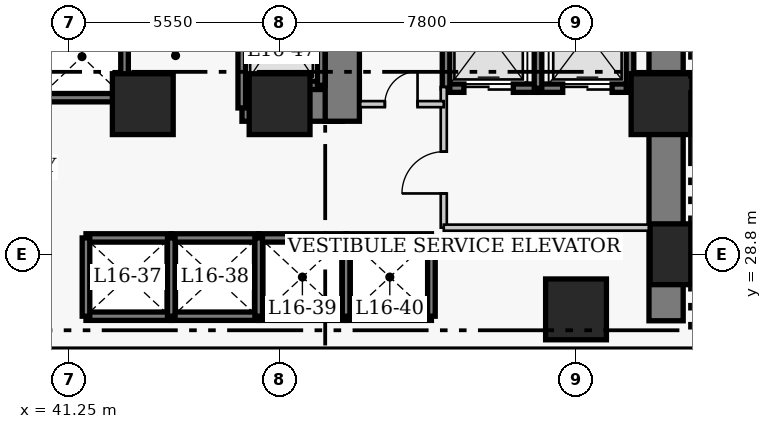
"""IFC4 building model, lengths in metres.
Left out: names, types, materials, properties, quantities, classifications, styles, units other than length and angle.
Written with IfcOpenShell. Run it as: python <this file> out.ifc"""

import sys

from ifc_helpers import new_model, si_unit, direction, frame, frame_2d, origin, origin_2d, place, context, subcontext, project, spatial, rectangle, extrude, element, fill, save


model = new_model("IFC4")
c1 = context("Model", 3, precision=1e-05, world=origin(), true_north=direction((0.0, 1.0)))
c2 = subcontext(c1, "Body", "Model", "MODEL_VIEW")
j1 = project(units=[si_unit("LENGTHUNIT", "METRE"), si_unit("PLANEANGLEUNIT", "RADIAN")], contexts=[c1])
p1 = place(None, origin())
s1 = spatial("IfcSite", under=j1, at=p1, CompositionType="ELEMENT")
p2 = place(p1, origin())
s2 = spatial("IfcBuilding", under=s1, at=p2, CompositionType="ELEMENT")
p3 = place(p2, frame((0.0, 0.0, 67.8)))
s3 = spatial("IfcBuildingStorey", under=s2, at=p3, CompositionType="ELEMENT", Elevation=67.8)
p4 = place(p3, frame((56.97, 27.05, 0.0), z_axis=(0.0, 0.0, 1.0), x_axis=(0.0, 1.0, 0.0)))
e1 = element("IfcWall", 1, at=p4, inside=s3, PredefinedType="SHEAR", context=c2, shape_type="SweptSolid", body=[
    extrude(rectangle(XDim=13.72, YDim=0.9, at=frame_2d((6.86, 0.0))), origin(), (0.0, 0.0, 1.0), 3.8),
])
p5 = place(p3, frame((45.81, 32.75, 0.0), z_axis=(0.0, 0.0, 1.0), x_axis=(1.0, 0.0, 0.0)))
e2 = element("IfcWall", 2, at=p5, inside=s3, PredefinedType="SHEAR", context=c2, shape_type="SweptSolid", body=[
    extrude(rectangle(XDim=2.64, YDim=0.9, at=frame_2d((1.32, 0.0))), origin(), (0.0, 0.0, 1.0), 3.8),
])
p6 = place(p3, frame((48.45, 32.3, 0.0), z_axis=(0.0, 0.0, 1.0), x_axis=(0.0, 1.0, 0.0)))
e3 = element("IfcWall", 3, at=p6, inside=s3, PredefinedType="SHEAR", context=c2, shape_type="SweptSolid", body=[
    extrude(rectangle(XDim=8.02, YDim=0.9, at=frame_2d((4.01, 0.0))), origin(), (0.0, 0.0, 1.0), 3.8),
])
p7 = place(p6, frame((5.9, 0.0, 0.0)))
e4 = element("IfcOpeningElement", 4, at=p7, cuts=e3, PredefinedType="OPENING", context=c2, shape_type="SweptSolid", body=[
    extrude(rectangle(XDim=1.1, YDim=2.15, at=frame_2d((0.55, 1.075))), frame((0.0, 0.46, 0.0), z_axis=(0.0, -1.0, 0.0), x_axis=(1.0, 0.0, 0.0)), (0.0, 0.0, 1.0), 0.92),
])
for number, where, z_axis, x_axis in (
    (5, (57.35, 28.8, 0.0), (0.0, 0.0, 1.0), (1.0, 0.0, 0.0)),
    (6, (43.2, 32.75, 0.0), (0.0, 0.0, 1.0), (1.0, 0.0, 0.0)),
    (7, (46.8, 32.75, 0.0), (0.0, 0.0, 1.0), (1.0, 0.0, 0.0)),
    (8, (54.6, 27.35, 0.0), (0.0, 0.0, 1.0), (1.0, 0.0, 0.0)),
    (9, (56.85, 32.75, 0.0), (0.0, 0.0, 1.0), (1.0, 0.0, 0.0)),
):
    element("IfcColumn", number, at=place(p3, frame(where, z_axis=z_axis, x_axis=x_axis)), inside=s3, PredefinedType="COLUMN", context=c2, shape_type="SweptSolid", body=[
        extrude(rectangle(XDim=1.6, YDim=1.6, at=origin_2d()), origin(), (0.0, 0.0, 1.0), 3.8),
    ])
for number, where, z_axis, x_axis in (
    (10, (41.705, 29.23, 0.0), (0.0, 0.0, 1.0), (1.0, 0.0, 0.0)),
    (11, (41.705, 27.17, 0.0), (0.0, 0.0, 1.0), (1.0, 0.0, 0.0)),
):
    element("IfcWall", number, at=place(p3, frame(where, z_axis=z_axis, x_axis=x_axis)), inside=s3, PredefinedType="SHEAR", context=c2, shape_type="SweptSolid", body=[
        extrude(rectangle(XDim=2.245, YDim=0.22, at=frame_2d((1.123, 0.0))), origin(), (0.0, 0.0, 1.0), 3.8),
    ])
p8 = place(p3, frame((41.705, 27.17, 0.0), z_axis=(0.0, 0.0, 1.0), x_axis=(0.0, 1.0, 0.0)))
e12 = element("IfcWall", 12, at=p8, inside=s3, PredefinedType="SHEAR", context=c2, shape_type="SweptSolid", body=[
    extrude(rectangle(XDim=2.06, YDim=0.2, at=frame_2d((1.03, 0.0))), origin(), (0.0, 0.0, 1.0), 3.8),
])
for number, where, z_axis, x_axis in (
    (13, (43.95, 29.23, 0.0), (0.0, 0.0, 1.0), (1.0, 0.0, 0.0)),
    (14, (43.95, 27.17, 0.0), (0.0, 0.0, 1.0), (1.0, 0.0, 0.0)),
):
    element("IfcWall", number, at=place(p3, frame(where, z_axis=z_axis, x_axis=x_axis)), inside=s3, PredefinedType="SHEAR", context=c2, shape_type="SweptSolid", body=[
        extrude(rectangle(XDim=2.3, YDim=0.22, at=frame_2d((1.15, 0.0))), origin(), (0.0, 0.0, 1.0), 3.8),
    ])
p9 = place(p3, frame((43.95, 27.17, 0.0), z_axis=(0.0, 0.0, 1.0), x_axis=(0.0, 1.0, 0.0)))
e15 = element("IfcWall", 15, at=p9, inside=s3, PredefinedType="SHEAR", context=c2, shape_type="SweptSolid", body=[
    extrude(rectangle(XDim=2.06, YDim=0.2, at=frame_2d((1.03, 0.0))), origin(), (0.0, 0.0, 1.0), 3.8),
])
for number, where, z_axis, x_axis in (
    (16, (46.25, 29.23, 0.0), (0.0, 0.0, 1.0), (1.0, 0.0, 0.0)),
    (17, (46.25, 27.17, 0.0), (0.0, 0.0, 1.0), (1.0, 0.0, 0.0)),
):
    element("IfcWall", number, at=place(p3, frame(where, z_axis=z_axis, x_axis=x_axis)), inside=s3, PredefinedType="SHEAR", context=c2, shape_type="SweptSolid", body=[
        extrude(rectangle(XDim=2.3, YDim=0.22, at=frame_2d((1.15, 0.0))), origin(), (0.0, 0.0, 1.0), 3.8),
    ])
p10 = place(p3, frame((46.25, 27.17, 0.0), z_axis=(0.0, 0.0, 1.0), x_axis=(0.0, 1.0, 0.0)))
e18 = element("IfcWall", 18, at=p10, inside=s3, PredefinedType="SHEAR", context=c2, shape_type="SweptSolid", body=[
    extrude(rectangle(XDim=2.06, YDim=0.2, at=frame_2d((1.03, 0.0))), origin(), (0.0, 0.0, 1.0), 3.8),
])
for number, where, z_axis, x_axis in (
    (19, (48.55, 29.23, 0.0), (0.0, 0.0, 1.0), (1.0, 0.0, 0.0)),
    (20, (48.55, 27.17, 0.0), (0.0, 0.0, 1.0), (1.0, 0.0, 0.0)),
):
    element("IfcWall", number, at=place(p3, frame(where, z_axis=z_axis, x_axis=x_axis)), inside=s3, PredefinedType="SHEAR", context=c2, shape_type="SweptSolid", body=[
        extrude(rectangle(XDim=2.245, YDim=0.22, at=frame_2d((1.123, 0.0))), origin(), (0.0, 0.0, 1.0), 3.8),
    ])
for number, where, z_axis, x_axis in (
    (21, (48.55, 27.17, 0.0), (0.0, 0.0, 1.0), (0.0, 1.0, 0.0)),
    (22, (50.795, 27.17, 0.0), (0.0, 0.0, 1.0), (0.0, 1.0, 0.0)),
):
    element("IfcWall", number, at=place(p3, frame(where, z_axis=z_axis, x_axis=x_axis)), inside=s3, PredefinedType="SHEAR", context=c2, shape_type="SweptSolid", body=[
        extrude(rectangle(XDim=2.06, YDim=0.2, at=frame_2d((1.03, 0.0))), origin(), (0.0, 0.0, 1.0), 3.8),
    ])
p11 = place(p3, frame((40.4, 32.92, 0.0), z_axis=(0.0, 0.0, 1.0), x_axis=(1.0, 0.0, 0.0)))
e23 = element("IfcWall", 23, at=p11, inside=s3, PredefinedType="SHEAR", context=c2, shape_type="SweptSolid", body=[
    extrude(rectangle(XDim=2.32, YDim=0.22, at=frame_2d((1.16, 0.0))), origin(), (0.0, 0.0, 1.0), 3.8),
])
p12 = place(p3, frame((42.72, 32.92, 0.0), z_axis=(0.0, 0.0, 1.0), x_axis=(0.0, 1.0, 0.0)))
e24 = element("IfcWall", 24, at=p12, inside=s3, PredefinedType="SHEAR", context=c2, shape_type="SweptSolid", body=[
    extrude(rectangle(XDim=2.16, YDim=0.2, at=frame_2d((1.08, 0.0))), origin(), (0.0, 0.0, 1.0), 3.8),
])
p13 = place(p3, frame((51.18, 33.17, 0.0), z_axis=(0.0, 0.0, 1.0), x_axis=(1.0, 0.0, 0.0)))
e25 = element("IfcWall", 25, at=p13, inside=s3, PredefinedType="SHEAR", context=c2, shape_type="SweptSolid", body=[
    extrude(rectangle(XDim=2.42, YDim=0.22, at=frame_2d((1.21, 0.0))), origin(), (0.0, 0.0, 1.0), 3.8),
])
p14 = place(p13, frame((0.47, 0.0, 0.0)))
e26 = element("IfcOpeningElement", 26, at=p14, cuts=e25, PredefinedType="OPENING", context=c2, shape_type="SweptSolid", body=[
    extrude(rectangle(XDim=1.3, YDim=2.15, at=frame_2d((0.65, 1.075))), frame((0.0, 0.12, 0.0), z_axis=(0.0, -1.0, 0.0), x_axis=(1.0, 0.0, 0.0)), (0.0, 0.0, 1.0), 0.24),
])
p15 = place(p3, frame((51.18, 33.17, 0.0), z_axis=(0.0, 0.0, 1.0), x_axis=(0.0, 1.0, 0.0)))
e27 = element("IfcWall", 27, at=p15, inside=s3, PredefinedType="SHEAR", context=c2, shape_type="SweptSolid", body=[
    extrude(rectangle(XDim=2.86, YDim=0.2, at=frame_2d((1.43, 0.0))), origin(), (0.0, 0.0, 1.0), 3.8),
])
p16 = place(p3, frame((53.6, 33.17, 0.0), z_axis=(0.0, 0.0, 1.0), x_axis=(1.0, 0.0, 0.0)))
e28 = element("IfcWall", 28, at=p16, inside=s3, PredefinedType="SHEAR", context=c2, shape_type="SweptSolid", body=[
    extrude(rectangle(XDim=2.42, YDim=0.22, at=frame_2d((1.21, 0.0))), origin(), (0.0, 0.0, 1.0), 3.8),
])
p17 = place(p16, frame((0.65, 0.0, 0.0)))
e29 = element("IfcOpeningElement", 29, at=p17, cuts=e28, PredefinedType="OPENING", context=c2, shape_type="SweptSolid", body=[
    extrude(rectangle(XDim=1.3, YDim=2.15, at=frame_2d((0.65, 1.075))), frame((0.0, 0.12, 0.0), z_axis=(0.0, -1.0, 0.0), x_axis=(1.0, 0.0, 0.0)), (0.0, 0.0, 1.0), 0.24),
])
for number, where, z_axis, x_axis in (
    (30, (53.6, 33.17, 0.0), (0.0, 0.0, 1.0), (0.0, 1.0, 0.0)),
    (31, (56.02, 33.17, 0.0), (0.0, 0.0, 1.0), (0.0, 1.0, 0.0)),
):
    element("IfcWall", number, at=place(p3, frame(where, z_axis=z_axis, x_axis=x_axis)), inside=s3, PredefinedType="SHEAR", context=c2, shape_type="SweptSolid", body=[
        extrude(rectangle(XDim=2.86, YDim=0.2, at=frame_2d((1.43, 0.0))), origin(), (0.0, 0.0, 1.0), 3.8),
    ])
p18 = place(p3, frame((45.805, 33.245, 0.0), z_axis=(0.0, 0.0, 1.0), x_axis=(1.0, 0.0, 0.0)))
e32 = element("IfcWall", 32, at=p18, inside=s3, PredefinedType="SHEAR", context=c2, shape_type="SweptSolid", body=[
    extrude(rectangle(XDim=2.09, YDim=0.22, at=frame_2d((1.045, 0.0))), origin(), (0.0, 0.0, 1.0), 3.8),
])
p19 = place(p3, frame((45.805, 32.65, 0.0), z_axis=(0.0, 0.0, 1.0), x_axis=(0.0, 1.0, 0.0)))
e33 = element("IfcWall", 33, at=p19, inside=s3, PredefinedType="SHEAR", context=c2, shape_type="SweptSolid", body=[
    extrude(rectangle(XDim=3.505, YDim=0.2, at=frame_2d((1.752, 0.0))), origin(), (0.0, 0.0, 1.0), 3.8),
])
p20 = place(p3, frame((47.895, 33.245, 0.0), z_axis=(0.0, 0.0, 1.0), x_axis=(0.0, 1.0, 0.0)))
e34 = element("IfcWall", 34, at=p20, inside=s3, PredefinedType="SHEAR", context=c2, shape_type="SweptSolid", body=[
    extrude(rectangle(XDim=2.91, YDim=0.2, at=frame_2d((1.455, 0.0))), origin(), (0.0, 0.0, 1.0), 3.8),
])
p21 = place(p3, frame((51.12, 29.5, 0.0), z_axis=(0.0, 0.0, 1.0), x_axis=(0.0, 1.0, 0.0)))
e35 = element("IfcWall", 35, at=p21, inside=s3, PredefinedType="PARTITIONING", context=c2, shape_type="SweptSolid", body=[
    extrude(rectangle(XDim=3.7, YDim=0.16, at=frame_2d((1.85, 0.0))), origin(), (0.0, 0.0, 1.0), 3.54),
])
p22 = place(p21, frame((0.9, 0.0, 0.0)))
e36 = element("IfcOpeningElement", 36, at=p22, cuts=e35, PredefinedType="OPENING", context=c2, shape_type="SweptSolid", body=[
    extrude(rectangle(XDim=1.1, YDim=2.15, at=frame_2d((0.55, 1.075))), frame((0.0, 0.09, 0.0), z_axis=(0.0, -1.0, 0.0), x_axis=(1.0, 0.0, 0.0)), (0.0, 0.0, 1.0), 0.18),
])
p23 = place(p3, frame((51.12, 29.5, 0.0), z_axis=(0.0, 0.0, 1.0), x_axis=(1.0, 0.0, 0.0)))
e37 = element("IfcWall", 37, at=p23, inside=s3, PredefinedType="PARTITIONING", context=c2, shape_type="SweptSolid", body=[
    extrude(rectangle(XDim=5.63, YDim=0.16, at=frame_2d((2.815, 0.0))), origin(), (0.0, 0.0, 1.0), 3.54),
])
p24 = place(p3, frame((48.92, 32.75, 0.0), z_axis=(0.0, 0.0, 1.0), x_axis=(1.0, 0.0, 0.0)))
e38 = element("IfcWall", 38, at=p24, inside=s3, PredefinedType="PARTITIONING", context=c2, shape_type="SweptSolid", body=[
    extrude(rectangle(XDim=2.2, YDim=0.16, at=frame_2d((1.1, 0.0))), origin(), (0.0, 0.0, 1.0), 3.54),
])
p25 = place(p24, frame((0.65, 0.0, 0.0)))
e39 = element("IfcOpeningElement", 39, at=p25, cuts=e38, PredefinedType="OPENING", context=c2, shape_type="SweptSolid", body=[
    extrude(rectangle(XDim=0.86, YDim=2.05, at=frame_2d((0.43, 1.025))), frame((0.0, 0.09, 0.0), z_axis=(0.0, -1.0, 0.0), x_axis=(1.0, 0.0, 0.0)), (0.0, 0.0, 1.0), 0.18),
])
p26 = place(p3, frame((35.85, 26.26, 0.0), z_axis=(0.0, 0.0, 1.0), x_axis=(1.0, 0.0, 0.0)))
e40 = element("IfcWall", 40, at=p26, inside=s3, PredefinedType="PARTITIONING", context=c2, shape_type="SweptSolid", body=[
    extrude(rectangle(XDim=23.45, YDim=0.16, at=frame_2d((11.725, 0.0))), origin(), (0.0, 0.0, 1.0), 3.54),
])
p27 = place(p14, origin())
e41 = element("IfcDoor", 41, at=p27, inside=s3, OperationType="DOUBLE_DOOR_SLIDING", PredefinedType="DOOR", context=c2, shape_type="SweptSolid", body=[
    extrude(rectangle(XDim=1.3, YDim=2.15, at=frame_2d((0.65, 1.075))), frame((0.0, 0.025, 0.0), z_axis=(0.0, -1.0, 0.0), x_axis=(1.0, 0.0, 0.0)), (0.0, 0.0, 1.0), 0.05),
])
fill(e26, e41)
p28 = place(p17, origin())
e42 = element("IfcDoor", 42, at=p28, inside=s3, OperationType="DOUBLE_DOOR_SLIDING", PredefinedType="DOOR", context=c2, shape_type="SweptSolid", body=[
    extrude(rectangle(XDim=1.3, YDim=2.15, at=frame_2d((0.65, 1.075))), frame((0.0, 0.025, 0.0), z_axis=(0.0, -1.0, 0.0), x_axis=(1.0, 0.0, 0.0)), (0.0, 0.0, 1.0), 0.05),
])
fill(e29, e42)
p29 = place(p22, origin())
e43 = element("IfcDoor", 43, at=p29, inside=s3, OperationType="SINGLE_SWING_LEFT", PredefinedType="DOOR", context=c2, shape_type="SweptSolid", body=[
    extrude(rectangle(XDim=1.1, YDim=2.15, at=frame_2d((0.55, 1.075))), frame((0.0, 0.025, 0.0), z_axis=(0.0, -1.0, 0.0), x_axis=(1.0, 0.0, 0.0)), (0.0, 0.0, 1.0), 0.05),
])
fill(e36, e43)
p30 = place(p25, origin())
e44 = element("IfcDoor", 44, at=p30, inside=s3, OperationType="SINGLE_SWING_RIGHT", PredefinedType="DOOR", context=c2, shape_type="SweptSolid", body=[
    extrude(rectangle(XDim=0.86, YDim=2.05, at=frame_2d((0.43, 1.025))), frame((0.0, 0.025, 0.0), z_axis=(0.0, -1.0, 0.0), x_axis=(1.0, 0.0, 0.0)), (0.0, 0.0, 1.0), 0.05),
])
fill(e39, e44)
save(model, sys.argv[1])
